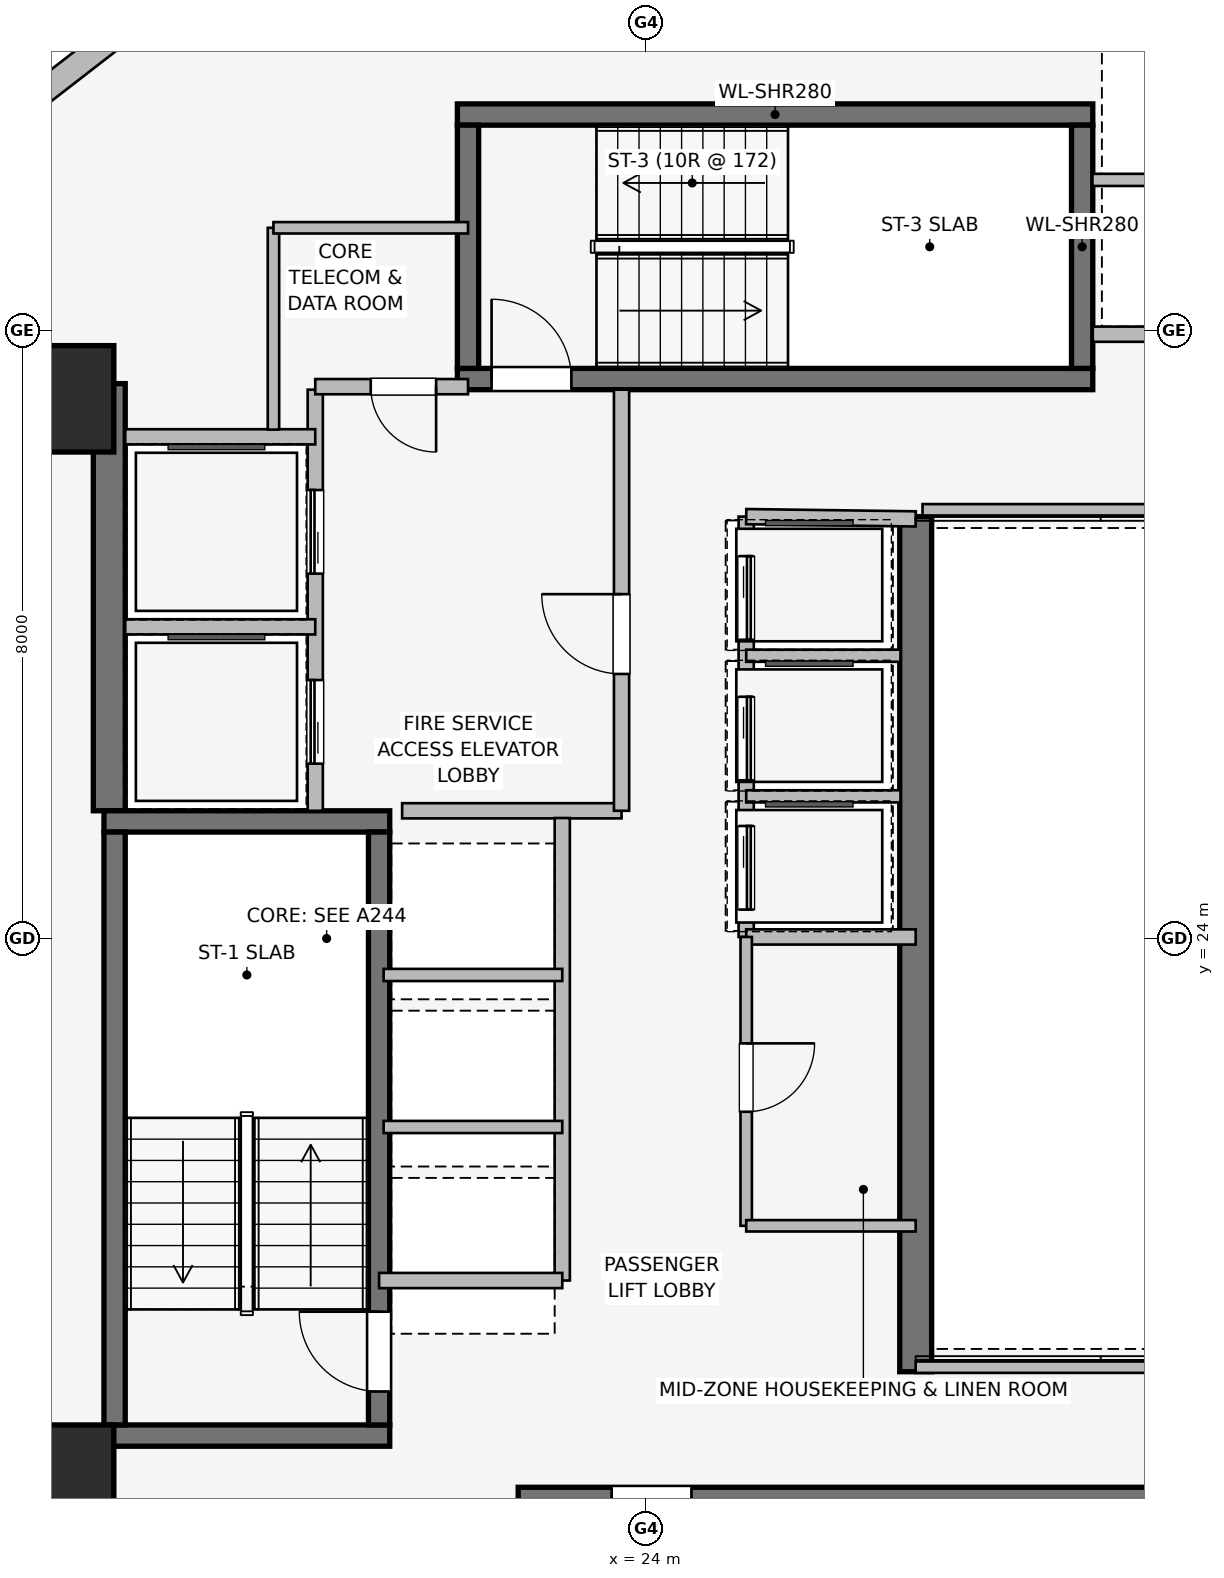
"""IFC4 building model, lengths in metres.
Left out: names, types, materials, properties, quantities, classifications, styles, units other than length and angle.
Written with IfcOpenShell. Run it as: python <this file> out.ifc"""

import sys

from ifc_helpers import new_model, si_unit, direction, frame, frame_2d, origin, origin_2d, place, context, subcontext, project, spatial, rectangle, extrude, element, fill, save


model = new_model("IFC4")
c1 = context("Model", 3, precision=1e-05, world=origin(), true_north=direction((0.0, 1.0)))
c2 = subcontext(c1, "Body", "Model", "MODEL_VIEW")
j1 = project(units=[si_unit("LENGTHUNIT", "METRE"), si_unit("PLANEANGLEUNIT", "RADIAN")], contexts=[c1])
p1 = place(None, origin())
s1 = spatial("IfcSite", under=j1, at=p1, CompositionType="ELEMENT")
p2 = place(p1, origin())
s2 = spatial("IfcBuilding", under=s1, at=p2, CompositionType="ELEMENT")
p3 = place(p2, frame((0.0, 0.0, 156.75)))
s3 = spatial("IfcBuildingStorey", under=s2, at=p3, CompositionType="ELEMENT", Elevation=156.75)
p4 = place(p3, frame((16.94, 25.68, 0.0), z_axis=(0.0, 0.0, 1.0), x_axis=(0.0, 1.0, 0.0)))
e1 = element("IfcWall", 1, at=p4, inside=s3, PredefinedType="SHEAR", context=c2, shape_type="SweptSolid", body=[
    extrude(rectangle(XDim=5.62, YDim=0.42, at=frame_2d((2.81, 0.0))), origin(), (0.0, 0.0, 1.0), 3.45),
])
p5 = place(p3, frame((27.55, 29.55, 0.0), z_axis=(0.0, 0.0, 1.0), x_axis=(0.0, -1.0, 0.0)))
e2 = element("IfcWall", 2, at=p5, inside=s3, PredefinedType="SHEAR", context=c2, shape_type="SweptSolid", body=[
    extrude(rectangle(XDim=11.25, YDim=0.42, at=frame_2d((5.625, 0.0))), origin(), (0.0, 0.0, 1.0), 3.45),
])
for number, where, z_axis, x_axis in (
    (3, (16.87, 17.46, 0.0), (0.0, 0.0, 1.0), (1.0, 0.0, 0.0)),
    (4, (20.63, 25.54, 0.0), (0.0, 0.0, 1.0), (-1.0, 0.0, 0.0)),
):
    element("IfcWall", number, at=place(p3, frame(where, z_axis=z_axis, x_axis=x_axis)), inside=s3, PredefinedType="SHEAR", context=c2, shape_type="SweptSolid", body=[
        extrude(rectangle(XDim=3.76, YDim=0.28, at=frame_2d((1.88, 0.0))), origin(), (0.0, 0.0, 1.0), 3.45),
    ])
p6 = place(p3, frame((17.01, 25.4, 0.0), z_axis=(0.0, 0.0, 1.0), x_axis=(0.0, -1.0, 0.0)))
e5 = element("IfcWall", 5, at=p6, inside=s3, PredefinedType="SHEAR", context=c2, shape_type="SweptSolid", body=[
    extrude(rectangle(XDim=7.8, YDim=0.28, at=frame_2d((3.9, 0.0))), origin(), (0.0, 0.0, 1.0), 3.45),
])
p7 = place(p3, frame((20.49, 17.6, 0.0), z_axis=(0.0, 0.0, 1.0), x_axis=(0.0, 1.0, 0.0)))
e6 = element("IfcWall", 6, at=p7, inside=s3, PredefinedType="SHEAR", context=c2, shape_type="SweptSolid", body=[
    extrude(rectangle(XDim=7.8, YDim=0.28, at=frame_2d((3.9, 0.0))), origin(), (0.0, 0.0, 1.0), 3.45),
])
p8 = place(p7, frame((0.44, 0.0, 0.0)))
e7 = element("IfcOpeningElement", 7, at=p8, cuts=e6, PredefinedType="OPENING", context=c2, shape_type="SweptSolid", body=[
    extrude(rectangle(XDim=1.05, YDim=2.0, at=frame_2d((0.525, 1.0))), frame((0.0, 0.15, 0.0), z_axis=(0.0, -1.0, 0.0), x_axis=(1.0, 0.0, 0.0)), (0.0, 0.0, 1.0), 0.3),
])
p9 = place(p3, frame((30.68, 16.64, 0.0), z_axis=(0.0, 0.0, 1.0), x_axis=(-1.0, 0.0, 0.0)))
e8 = element("IfcWall", 8, at=p9, inside=s3, PredefinedType="SHEAR", context=c2, shape_type="SweptSolid", body=[
    extrude(rectangle(XDim=8.36, YDim=0.28, at=frame_2d((4.18, 0.0))), origin(), (0.0, 0.0, 1.0), 3.45),
])
p10 = place(p9, frame((6.08, 0.0, 0.0)))
e9 = element("IfcOpeningElement", 9, at=p10, cuts=e8, PredefinedType="OPENING", context=c2, shape_type="SweptSolid", body=[
    extrude(rectangle(XDim=1.05, YDim=2.0, at=frame_2d((0.525, 1.0))), frame((0.0, 0.15, 0.0), z_axis=(0.0, -1.0, 0.0), x_axis=(1.0, 0.0, 0.0)), (0.0, 0.0, 1.0), 0.3),
])
p11 = place(p3, frame((21.52, 31.36, 0.0), z_axis=(0.0, 0.0, 1.0), x_axis=(1.0, 0.0, 0.0)))
e10 = element("IfcWall", 10, at=p11, inside=s3, PredefinedType="SHEAR", context=c2, shape_type="SweptSolid", body=[
    extrude(rectangle(XDim=8.36, YDim=0.28, at=frame_2d((4.18, 0.0))), origin(), (0.0, 0.0, 1.0), 3.45),
])
p12 = place(p11, frame((0.45, 0.0, 0.0)))
e11 = element("IfcOpeningElement", 11, at=p12, cuts=e10, PredefinedType="OPENING", context=c2, shape_type="SweptSolid", body=[
    extrude(rectangle(XDim=1.05, YDim=2.0, at=frame_2d((0.525, 1.0))), frame((0.0, 0.15, 0.0), z_axis=(0.0, -1.0, 0.0), x_axis=(1.0, 0.0, 0.0)), (0.0, 0.0, 1.0), 0.3),
])
p13 = place(p3, frame((29.88, 34.84, 0.0), z_axis=(0.0, 0.0, 1.0), x_axis=(-1.0, 0.0, 0.0)))
e12 = element("IfcWall", 12, at=p13, inside=s3, PredefinedType="SHEAR", context=c2, shape_type="SweptSolid", body=[
    extrude(rectangle(XDim=8.36, YDim=0.28, at=frame_2d((4.18, 0.0))), origin(), (0.0, 0.0, 1.0), 3.45),
])
for number, where, z_axis, x_axis in (
    (13, (21.66, 34.7, 0.0), (0.0, 0.0, 1.0), (0.0, -1.0, 0.0)),
    (14, (29.74, 31.5, 0.0), (0.0, 0.0, 1.0), (0.0, 1.0, 0.0)),
):
    element("IfcWall", number, at=place(p3, frame(where, z_axis=z_axis, x_axis=x_axis)), inside=s3, PredefinedType="SHEAR", context=c2, shape_type="SweptSolid", body=[
        extrude(rectangle(XDim=3.2, YDim=0.28, at=frame_2d((1.6, 0.0))), origin(), (0.0, 0.0, 1.0), 3.45),
    ])
for number, where, z_axis, x_axis in (
    (15, (16.3, 16.9, 0.0), (0.0, 0.0, 1.0), (1.0, 0.0, 0.0)),
    (16, (16.3, 31.1, 0.0), (0.0, 0.0, 1.0), (1.0, 0.0, 0.0)),
):
    element("IfcColumn", number, at=place(p3, frame(where, z_axis=z_axis, x_axis=x_axis)), inside=s3, PredefinedType="COLUMN", context=c2, shape_type="SweptSolid", body=[
        extrude(rectangle(XDim=1.4, YDim=1.4, at=origin_2d()), origin(), (0.0, 0.0, 1.0), 3.45),
    ])
p14 = place(p3, frame((15.918, 35.024, 0.0), z_axis=(0.0, 0.0, 1.0), x_axis=(0.790621329885, 0.612305408053, 0.0)))
e17 = element("IfcWall", 17, at=p14, inside=s3, PredefinedType="STANDARD", context=c2, shape_type="SweptSolid", body=[
    extrude(rectangle(XDim=1.676, YDim=0.33, at=frame_2d((0.838, 0.0))), origin(), (0.0, 0.0, 1.0), 3.19),
])
p15 = place(p3, frame((19.65, 25.68, 0.0), z_axis=(0.0, 0.0, 1.0), x_axis=(0.0, 1.0, 0.0)))
e18 = element("IfcWall", 18, at=p15, inside=s3, PredefinedType="PARTITIONING", context=c2, shape_type="SweptSolid", body=[
    extrude(rectangle(XDim=5.54, YDim=0.2, at=frame_2d((2.77, 0.0))), origin(), (0.0, 0.0, 1.0), 3.19),
])
p16 = place(p15, frame((0.62, 0.0, 0.0)))
e19 = element("IfcOpeningElement", 19, at=p16, cuts=e18, PredefinedType="OPENING", context=c2, shape_type="SweptSolid", body=[
    extrude(rectangle(XDim=1.1, YDim=2.2, at=frame_2d((0.55, 1.1))), frame((0.0, 0.11, 0.0), z_axis=(0.0, -1.0, 0.0), x_axis=(1.0, 0.0, 0.0)), (0.0, 0.0, 1.0), 0.22),
])
p17 = place(p15, frame((3.12, 0.0, 0.0)))
e20 = element("IfcOpeningElement", 20, at=p17, cuts=e18, PredefinedType="OPENING", context=c2, shape_type="SweptSolid", body=[
    extrude(rectangle(XDim=1.1, YDim=2.2, at=frame_2d((0.55, 1.1))), frame((0.0, 0.11, 0.0), z_axis=(0.0, -1.0, 0.0), x_axis=(1.0, 0.0, 0.0)), (0.0, 0.0, 1.0), 0.22),
])
p18 = place(p3, frame((20.793, 25.68, 0.0), z_axis=(0.0, 0.0, 1.0), x_axis=(1.0, 0.0, 0.0)))
e21 = element("IfcWall", 21, at=p18, inside=s3, PredefinedType="PARTITIONING", context=c2, shape_type="SweptSolid", body=[
    extrude(rectangle(XDim=2.887, YDim=0.2, at=frame_2d((1.443, 0.0))), origin(), (0.0, 0.0, 1.0), 3.19),
])
p19 = place(p3, frame((23.68, 25.68, 0.0), z_axis=(0.0, 0.0, 1.0), x_axis=(0.0, 1.0, 0.0)))
e22 = element("IfcWall", 22, at=p19, inside=s3, PredefinedType="PARTITIONING", context=c2, shape_type="SweptSolid", body=[
    extrude(rectangle(XDim=5.54, YDim=0.2, at=frame_2d((2.77, 0.0))), origin(), (0.0, 0.0, 1.0), 3.19),
])
p20 = place(p19, frame((1.8, 0.0, 0.0)))
e23 = element("IfcOpeningElement", 23, at=p20, cuts=e22, PredefinedType="OPENING", context=c2, shape_type="SweptSolid", body=[
    extrude(rectangle(XDim=1.05, YDim=2.0, at=frame_2d((0.525, 1.0))), frame((0.0, 0.11, 0.0), z_axis=(0.0, -1.0, 0.0), x_axis=(1.0, 0.0, 0.0)), (0.0, 0.0, 1.0), 0.22),
])
p21 = place(p3, frame((21.66, 31.26, 0.0), z_axis=(0.0, 0.0, 1.0), x_axis=(-1.0, 0.0, 0.0)))
e24 = element("IfcWall", 24, at=p21, inside=s3, PredefinedType="PARTITIONING", context=c2, shape_type="SweptSolid", body=[
    extrude(rectangle(XDim=2.01, YDim=0.2, at=frame_2d((1.005, 0.0))), origin(), (0.0, 0.0, 1.0), 3.19),
])
p22 = place(p21, frame((0.42, 0.0, 0.0)))
e25 = element("IfcOpeningElement", 25, at=p22, cuts=e24, PredefinedType="OPENING", context=c2, shape_type="SweptSolid", body=[
    extrude(rectangle(XDim=0.86, YDim=2.0, at=frame_2d((0.43, 1.0))), frame((0.0, 0.11, 0.0), z_axis=(0.0, -1.0, 0.0), x_axis=(1.0, 0.0, 0.0)), (0.0, 0.0, 1.0), 0.22),
])
p23 = place(p3, frame((17.15, 28.1, 0.0), z_axis=(0.0, 0.0, 1.0), x_axis=(1.0, 0.0, 0.0)))
e26 = element("IfcWall", 26, at=p23, inside=s3, PredefinedType="PARTITIONING", context=c2, shape_type="SweptSolid", body=[
    extrude(rectangle(XDim=2.5, YDim=0.2, at=frame_2d((1.25, 0.0))), origin(), (0.0, 0.0, 1.0), 3.19),
])
p24 = place(p3, frame((19.65, 30.6, 0.0), z_axis=(0.0, 0.0, 1.0), x_axis=(-1.0, 0.0, 0.0)))
e27 = element("IfcWall", 27, at=p24, inside=s3, PredefinedType="PARTITIONING", context=c2, shape_type="SweptSolid", body=[
    extrude(rectangle(XDim=2.5, YDim=0.2, at=frame_2d((1.25, 0.0))), origin(), (0.0, 0.0, 1.0), 2.09),
])
p25 = place(p3, frame((32.48, 31.95, 0.0), z_axis=(0.0, 0.0, 1.0), x_axis=(-1.0, 0.0, 0.0)))
e28 = element("IfcWall", 28, at=p25, inside=s3, PredefinedType="PARTITIONING", context=c2, shape_type="SweptSolid", body=[
    extrude(rectangle(XDim=2.6, YDim=0.2, at=frame_2d((1.3, 0.0))), origin(), (0.0, 0.0, 1.0), 3.19),
])
p26 = place(p3, frame((29.875, 33.98, 0.0), z_axis=(0.0, 0.0, 1.0), x_axis=(1.0, 0.0, 0.0)))
e29 = element("IfcWall", 29, at=p26, inside=s3, PredefinedType="PARTITIONING", context=c2, shape_type="SweptSolid", body=[
    extrude(rectangle(XDim=2.605, YDim=0.16, at=frame_2d((1.302, 0.0))), origin(), (0.0, 0.0, 1.0), 3.19),
])
p27 = place(p3, frame((22.9, 19.5, 0.0), z_axis=(0.0, 0.0, 1.0), x_axis=(0.0, 1.0, 0.0)))
e30 = element("IfcWall", 30, at=p27, inside=s3, PredefinedType="PARTITIONING", context=c2, shape_type="SweptSolid", body=[
    extrude(rectangle(XDim=6.085, YDim=0.2, at=frame_2d((3.042, 0.0))), origin(), (0.0, 0.0, 1.0), 3.19),
])
p28 = place(p3, frame((20.49, 19.5, 0.0), z_axis=(0.0, 0.0, 1.0), x_axis=(1.0, 0.0, 0.0)))
e31 = element("IfcWall", 31, at=p28, inside=s3, PredefinedType="PARTITIONING", context=c2, shape_type="SweptSolid", body=[
    extrude(rectangle(XDim=2.41, YDim=0.2, at=frame_2d((1.205, 0.0))), origin(), (0.0, 0.0, 1.0), 2.09),
])
for number, where, z_axis, x_axis in (
    (32, (20.55, 21.52, 0.0), (0.0, 0.0, 1.0), (1.0, 0.0, 0.0)),
    (33, (20.55, 23.52, 0.0), (0.0, 0.0, 1.0), (1.0, 0.0, 0.0)),
):
    element("IfcWall", number, at=place(p3, frame(where, z_axis=z_axis, x_axis=x_axis)), inside=s3, PredefinedType="PARTITIONING", context=c2, shape_type="SweptSolid", body=[
        extrude(rectangle(XDim=2.35, YDim=0.16, at=frame_2d((1.175, 0.0))), origin(), (0.0, 0.0, 1.0), 3.19),
    ])
p29 = place(p3, frame((25.32, 29.55, 0.0), z_axis=(0.0, 0.0, 1.0), x_axis=(0.0, -1.0, 0.0)))
e34 = element("IfcWall", 34, at=p29, inside=s3, PredefinedType="PARTITIONING", context=c2, shape_type="SweptSolid", body=[
    extrude(rectangle(XDim=5.53, YDim=0.2, at=frame_2d((2.765, 0.0))), origin(), (0.0, 0.0, 1.0), 3.19),
])
p30 = place(p29, frame((0.52, 0.0, 0.0)))
e35 = element("IfcOpeningElement", 35, at=p30, cuts=e34, PredefinedType="OPENING", context=c2, shape_type="SweptSolid", body=[
    extrude(rectangle(XDim=1.1, YDim=2.2, at=frame_2d((0.55, 1.1))), frame((0.0, 0.11, 0.0), z_axis=(0.0, -1.0, 0.0), x_axis=(1.0, 0.0, 0.0)), (0.0, 0.0, 1.0), 0.22),
])
p31 = place(p29, frame((2.37, 0.0, 0.0)))
e36 = element("IfcOpeningElement", 36, at=p31, cuts=e34, PredefinedType="OPENING", context=c2, shape_type="SweptSolid", body=[
    extrude(rectangle(XDim=1.1, YDim=2.2, at=frame_2d((0.55, 1.1))), frame((0.0, 0.11, 0.0), z_axis=(0.0, -1.0, 0.0), x_axis=(1.0, 0.0, 0.0)), (0.0, 0.0, 1.0), 0.22),
])
p32 = place(p29, frame((4.07, 0.0, 0.0)))
e37 = element("IfcOpeningElement", 37, at=p32, cuts=e34, PredefinedType="OPENING", context=c2, shape_type="SweptSolid", body=[
    extrude(rectangle(XDim=1.1, YDim=2.2, at=frame_2d((0.55, 1.1))), frame((0.0, 0.11, 0.0), z_axis=(0.0, -1.0, 0.0), x_axis=(1.0, 0.0, 0.0)), (0.0, 0.0, 1.0), 0.22),
])
p33 = place(p3, frame((27.55, 29.52, 0.0), z_axis=(0.0, 0.0, 1.0), x_axis=(-0.999909343457, 0.013464949556, 0.0)))
e38 = element("IfcWall", 38, at=p33, inside=s3, PredefinedType="PARTITIONING", context=c2, shape_type="SweptSolid", body=[
    extrude(rectangle(XDim=2.23, YDim=0.2, at=frame_2d((1.115, 0.0))), origin(), (0.0, 0.0, 1.0), 2.09),
])
p34 = place(p3, frame((25.32, 24.02, 0.0), z_axis=(0.0, 0.0, 1.0), x_axis=(1.0, 0.0, 0.0)))
e39 = element("IfcWall", 39, at=p34, inside=s3, PredefinedType="PARTITIONING", context=c2, shape_type="SweptSolid", body=[
    extrude(rectangle(XDim=2.23, YDim=0.2, at=frame_2d((1.115, 0.0))), origin(), (0.0, 0.0, 1.0), 3.19),
])
for number, where, z_axis, x_axis in (
    (40, (25.32, 25.87, 0.0), (0.0, 0.0, 1.0), (1.0, 0.0, 0.0)),
    (41, (25.32, 27.72, 0.0), (0.0, 0.0, 1.0), (1.0, 0.0, 0.0)),
):
    element("IfcWall", number, at=place(p3, frame(where, z_axis=z_axis, x_axis=x_axis)), inside=s3, PredefinedType="PARTITIONING", context=c2, shape_type="SweptSolid", body=[
        extrude(rectangle(XDim=2.03, YDim=0.16, at=frame_2d((1.015, 0.0))), origin(), (0.0, 0.0, 1.0), 3.19),
    ])
p35 = place(p3, frame((25.32, 24.02, 0.0), z_axis=(0.0, 0.0, 1.0), x_axis=(0.0, -1.0, 0.0)))
e42 = element("IfcWall", 42, at=p35, inside=s3, PredefinedType="PARTITIONING", context=c2, shape_type="SweptSolid", body=[
    extrude(rectangle(XDim=3.8, YDim=0.15, at=frame_2d((1.9, 0.0))), origin(), (0.0, 0.0, 1.0), 3.19),
])
p36 = place(p35, frame((1.4, 0.0, 0.0)))
e43 = element("IfcOpeningElement", 43, at=p36, cuts=e42, PredefinedType="OPENING", context=c2, shape_type="SweptSolid", body=[
    extrude(rectangle(XDim=0.9, YDim=2.0, at=frame_2d((0.45, 1.0))), frame((0.0, 0.085, 0.0), z_axis=(0.0, -1.0, 0.0), x_axis=(1.0, 0.0, 0.0)), (0.0, 0.0, 1.0), 0.17),
])
p37 = place(p3, frame((25.32, 20.22, 0.0), z_axis=(0.0, 0.0, 1.0), x_axis=(1.0, 0.0, 0.0)))
e44 = element("IfcWall", 44, at=p37, inside=s3, PredefinedType="PARTITIONING", context=c2, shape_type="SweptSolid", body=[
    extrude(rectangle(XDim=2.23, YDim=0.15, at=frame_2d((1.115, 0.0))), origin(), (0.0, 0.0, 1.0), 3.19),
])
p38 = place(p3, frame((19.1, 33.35, 0.0), z_axis=(0.0, 0.0, 1.0), x_axis=(0.0, -1.0, 0.0)))
e45 = element("IfcWall", 45, at=p38, inside=s3, PredefinedType="PARTITIONING", context=c2, shape_type="SweptSolid", body=[
    extrude(rectangle(XDim=2.655, YDim=0.15, at=frame_2d((1.328, 0.0))), origin(), (0.0, 0.0, 1.0), 2.42),
])
p39 = place(p3, frame((21.66, 33.35, 0.0), z_axis=(0.0, 0.0, 1.0), x_axis=(-1.0, 0.0, 0.0)))
e46 = element("IfcWall", 46, at=p39, inside=s3, PredefinedType="PARTITIONING", context=c2, shape_type="SweptSolid", body=[
    extrude(rectangle(XDim=2.56, YDim=0.15, at=frame_2d((1.28, 0.0))), origin(), (0.0, 0.0, 1.0), 3.19),
])
p40 = place(p3, frame((27.55, 18.36, 0.0), z_axis=(0.0, 0.0, 1.0), x_axis=(1.0, 0.0, 0.0)))
e47 = element("IfcWall", 47, at=p40, inside=s3, PredefinedType="PARTITIONING", context=c2, shape_type="SweptSolid", body=[
    extrude(rectangle(XDim=12.29, YDim=0.15, at=frame_2d((6.145, 0.0))), origin(), (0.0, 0.0, 1.0), 2.331),
])
p41 = place(p3, frame((39.84, 29.64, 0.0), z_axis=(0.0, 0.0, 1.0), x_axis=(-1.0, 0.0, 0.0)))
e48 = element("IfcWall", 48, at=p41, inside=s3, PredefinedType="PARTITIONING", context=c2, shape_type="SweptSolid", body=[
    extrude(rectangle(XDim=12.2, YDim=0.15, at=frame_2d((6.1, 0.0))), origin(), (0.0, 0.0, 1.0), 2.331),
])
p42 = place(p8, origin())
e49 = element("IfcDoor", 49, at=p42, inside=s3, OperationType="SINGLE_SWING_RIGHT", PredefinedType="DOOR", context=c2, shape_type="SweptSolid", body=[
    extrude(rectangle(XDim=1.05, YDim=2.0, at=frame_2d((0.525, 1.0))), frame((0.0, 0.025, 0.0), z_axis=(0.0, -1.0, 0.0), x_axis=(1.0, 0.0, 0.0)), (0.0, 0.0, 1.0), 0.05),
])
fill(e7, e49)
p43 = place(p10, origin())
e50 = element("IfcDoor", 50, at=p43, inside=s3, OperationType="SINGLE_SWING_RIGHT", PredefinedType="DOOR", context=c2, shape_type="SweptSolid", body=[
    extrude(rectangle(XDim=1.05, YDim=2.0, at=frame_2d((0.525, 1.0))), frame((0.0, 0.025, 0.0), z_axis=(0.0, -1.0, 0.0), x_axis=(1.0, 0.0, 0.0)), (0.0, 0.0, 1.0), 0.05),
])
fill(e9, e50)
p44 = place(p12, origin())
e51 = element("IfcDoor", 51, at=p44, inside=s3, OperationType="SINGLE_SWING_LEFT", PredefinedType="DOOR", context=c2, shape_type="SweptSolid", body=[
    extrude(rectangle(XDim=1.05, YDim=2.0, at=frame_2d((0.525, 1.0))), frame((0.0, 0.025, 0.0), z_axis=(0.0, -1.0, 0.0), x_axis=(1.0, 0.0, 0.0)), (0.0, 0.0, 1.0), 0.05),
])
fill(e11, e51)
p45 = place(p16, origin())
e52 = element("IfcDoor", 52, at=p45, inside=s3, OperationType="SLIDING_TO_LEFT", PredefinedType="DOOR", context=c2, shape_type="SweptSolid", body=[
    extrude(rectangle(XDim=1.1, YDim=2.2, at=frame_2d((0.55, 1.1))), frame((0.0, 0.025, 0.0), z_axis=(0.0, -1.0, 0.0), x_axis=(1.0, 0.0, 0.0)), (0.0, 0.0, 1.0), 0.05),
])
fill(e19, e52)
p46 = place(p17, origin())
e53 = element("IfcDoor", 53, at=p46, inside=s3, OperationType="SLIDING_TO_LEFT", PredefinedType="DOOR", context=c2, shape_type="SweptSolid", body=[
    extrude(rectangle(XDim=1.1, YDim=2.2, at=frame_2d((0.55, 1.1))), frame((0.0, 0.025, 0.0), z_axis=(0.0, -1.0, 0.0), x_axis=(1.0, 0.0, 0.0)), (0.0, 0.0, 1.0), 0.05),
])
fill(e20, e53)
p47 = place(p20, origin())
e54 = element("IfcDoor", 54, at=p47, inside=s3, OperationType="SINGLE_SWING_RIGHT", PredefinedType="DOOR", context=c2, shape_type="SweptSolid", body=[
    extrude(rectangle(XDim=1.05, YDim=2.0, at=frame_2d((0.525, 1.0))), frame((0.0, 0.025, 0.0), z_axis=(0.0, -1.0, 0.0), x_axis=(1.0, 0.0, 0.0)), (0.0, 0.0, 1.0), 0.05),
])
fill(e23, e54)
p48 = place(p22, origin())
e55 = element("IfcDoor", 55, at=p48, inside=s3, OperationType="SINGLE_SWING_LEFT", PredefinedType="DOOR", context=c2, shape_type="SweptSolid", body=[
    extrude(rectangle(XDim=0.86, YDim=2.0, at=frame_2d((0.43, 1.0))), frame((0.0, 0.025, 0.0), z_axis=(0.0, -1.0, 0.0), x_axis=(1.0, 0.0, 0.0)), (0.0, 0.0, 1.0), 0.05),
])
fill(e25, e55)
p49 = place(p30, origin())
e56 = element("IfcDoor", 56, at=p49, inside=s3, OperationType="SLIDING_TO_LEFT", PredefinedType="DOOR", context=c2, shape_type="SweptSolid", body=[
    extrude(rectangle(XDim=1.1, YDim=2.2, at=frame_2d((0.55, 1.1))), frame((0.0, 0.025, 0.0), z_axis=(0.0, -1.0, 0.0), x_axis=(1.0, 0.0, 0.0)), (0.0, 0.0, 1.0), 0.05),
])
fill(e35, e56)
p50 = place(p31, origin())
e57 = element("IfcDoor", 57, at=p50, inside=s3, OperationType="SLIDING_TO_LEFT", PredefinedType="DOOR", context=c2, shape_type="SweptSolid", body=[
    extrude(rectangle(XDim=1.1, YDim=2.2, at=frame_2d((0.55, 1.1))), frame((0.0, 0.025, 0.0), z_axis=(0.0, -1.0, 0.0), x_axis=(1.0, 0.0, 0.0)), (0.0, 0.0, 1.0), 0.05),
])
fill(e36, e57)
p51 = place(p32, origin())
e58 = element("IfcDoor", 58, at=p51, inside=s3, OperationType="SLIDING_TO_LEFT", PredefinedType="DOOR", context=c2, shape_type="SweptSolid", body=[
    extrude(rectangle(XDim=1.1, YDim=2.2, at=frame_2d((0.55, 1.1))), frame((0.0, 0.025, 0.0), z_axis=(0.0, -1.0, 0.0), x_axis=(1.0, 0.0, 0.0)), (0.0, 0.0, 1.0), 0.05),
])
fill(e37, e58)
p52 = place(p36, origin())
e59 = element("IfcDoor", 59, at=p52, inside=s3, OperationType="SINGLE_SWING_LEFT", PredefinedType="DOOR", context=c2, shape_type="SweptSolid", body=[
    extrude(rectangle(XDim=0.9, YDim=2.0, at=frame_2d((0.45, 1.0))), frame((0.0, 0.025, 0.0), z_axis=(0.0, -1.0, 0.0), x_axis=(1.0, 0.0, 0.0)), (0.0, 0.0, 1.0), 0.05),
])
fill(e43, e59)
save(model, sys.argv[1])
